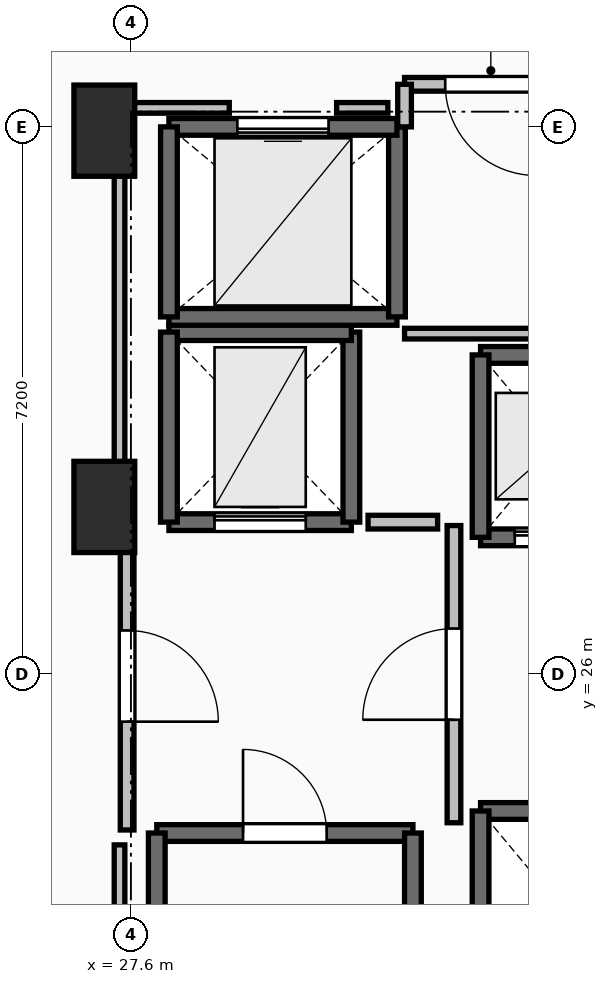
"""IFC4 building model, lengths in metres.
Left out: names, types, materials, properties, quantities, classifications, styles, units other than length and angle.
Written with IfcOpenShell. Run it as: python <this file> out.ifc"""

import sys

from ifc_helpers import new_model, si_unit, direction, frame, frame_2d, origin, origin_2d, place, context, subcontext, project, spatial, rectangle, extrude, element, fill, save


model = new_model("IFC4")
c1 = context("Model", 3, precision=1e-05, world=origin(), true_north=direction((0.0, 1.0)))
c2 = subcontext(c1, "Body", "Model", "MODEL_VIEW")
j1 = project(units=[si_unit("LENGTHUNIT", "METRE"), si_unit("PLANEANGLEUNIT", "RADIAN")], contexts=[c1])
p1 = place(None, origin())
s1 = spatial("IfcSite", under=j1, at=p1, CompositionType="ELEMENT")
p2 = place(p1, origin())
s2 = spatial("IfcBuilding", under=s1, at=p2, CompositionType="ELEMENT")
p3 = place(p2, frame((0.0, 0.0, 59.0)))
s3 = spatial("IfcBuildingStorey", under=s2, at=p3, CompositionType="ELEMENT", Elevation=59.0)
for number, where, z_axis, x_axis in (
    (1, (27.25, 28.2, 0.0), (0.0, 0.0, 1.0), (1.0, 0.0, 0.0)),
    (2, (27.25, 33.15, 0.0), (0.0, 0.0, 1.0), (1.0, 0.0, 0.0)),
):
    element("IfcColumn", number, at=place(p3, frame(where, z_axis=z_axis, x_axis=x_axis)), inside=s3, PredefinedType="PILASTER", context=c2, shape_type="SweptSolid", body=[
        extrude(rectangle(XDim=0.8, YDim=1.2, at=origin_2d()), origin(), (0.0, 0.0, 1.0), 3.5),
    ])
p4 = place(p3, frame((27.94, 23.91, 0.0), z_axis=(0.0, 0.0, 1.0), x_axis=(1.0, 0.0, 0.0)))
e3 = element("IfcWall", 3, at=p4, inside=s3, PredefinedType="SOLIDWALL", context=c2, shape_type="SweptSolid", body=[
    extrude(rectangle(XDim=3.37, YDim=0.22, at=frame_2d((1.685, 0.0))), origin(), (0.0, 0.0, 1.0), 3.24),
])
p5 = place(p4, frame((1.135, 0.0, 0.0)))
e4 = element("IfcOpeningElement", 4, at=p5, cuts=e3, PredefinedType="OPENING", context=c2, shape_type="SweptSolid", body=[
    extrude(rectangle(XDim=1.1, YDim=2.15, at=frame_2d((0.55, 1.075))), frame((0.0, 0.125, 0.0), z_axis=(0.0, -1.0, 0.0), x_axis=(1.0, 0.0, 0.0)), (0.0, 0.0, 1.0), 0.25),
])
for number, where, z_axis, x_axis in (
    (5, (31.31, 23.91, 0.0), (0.0, 0.0, 1.0), (0.0, -1.0, 0.0)),
    (6, (27.94, 16.49, 0.0), (0.0, 0.0, 1.0), (0.0, 1.0, 0.0)),
):
    element("IfcWall", number, at=place(p3, frame(where, z_axis=z_axis, x_axis=x_axis)), inside=s3, PredefinedType="SOLIDWALL", context=c2, shape_type="SweptSolid", body=[
        extrude(rectangle(XDim=7.42, YDim=0.22, at=frame_2d((3.71, 0.0))), origin(), (0.0, 0.0, 1.0), 3.24),
    ])
p6 = place(p3, frame((32.2, 27.8, 0.0), z_axis=(0.0, 0.0, 1.0), x_axis=(1.0, 0.0, 0.0)))
e7 = element("IfcWall", 7, at=p6, inside=s3, PredefinedType="SOLIDWALL", context=c2, shape_type="SweptSolid", body=[
    extrude(rectangle(XDim=2.0, YDim=0.22, at=frame_2d((1.0, 0.0))), origin(), (0.0, 0.0, 1.0), 3.24),
])
p7 = place(p6, frame((0.45, 0.0, 0.0)))
e8 = element("IfcOpeningElement", 8, at=p7, cuts=e7, PredefinedType="OPENING", context=c2, shape_type="SweptSolid", body=[
    extrude(rectangle(XDim=1.1, YDim=2.2, at=frame_2d((0.55, 1.1))), frame((0.0, 0.125, 0.0), z_axis=(0.0, -1.0, 0.0), x_axis=(1.0, 0.0, 0.0)), (0.0, 0.0, 1.0), 0.25),
])
p8 = place(p3, frame((34.2, 30.2, 0.0), z_axis=(0.0, 0.0, 1.0), x_axis=(-1.0, 0.0, 0.0)))
e9 = element("IfcWall", 9, at=p8, inside=s3, PredefinedType="SOLIDWALL", context=c2, shape_type="SweptSolid", body=[
    extrude(rectangle(XDim=2.0, YDim=0.22, at=frame_2d((1.0, 0.0))), origin(), (0.0, 0.0, 1.0), 3.24),
])
p9 = place(p3, frame((32.2, 30.2, 0.0), z_axis=(0.0, 0.0, 1.0), x_axis=(0.0, -1.0, 0.0)))
e10 = element("IfcWall", 10, at=p9, inside=s3, PredefinedType="SOLIDWALL", context=c2, shape_type="SweptSolid", body=[
    extrude(rectangle(XDim=2.4, YDim=0.22, at=frame_2d((1.2, 0.0))), origin(), (0.0, 0.0, 1.0), 3.24),
])
p10 = place(p3, frame((34.2, 24.2, 0.0), z_axis=(0.0, 0.0, 1.0), x_axis=(-1.0, 0.0, 0.0)))
e11 = element("IfcWall", 11, at=p10, inside=s3, PredefinedType="SOLIDWALL", context=c2, shape_type="SweptSolid", body=[
    extrude(rectangle(XDim=2.0, YDim=0.22, at=frame_2d((1.0, 0.0))), origin(), (0.0, 0.0, 1.0), 3.24),
])
p11 = place(p3, frame((32.2, 24.2, 0.0), z_axis=(0.0, 0.0, 1.0), x_axis=(0.0, -1.0, 0.0)))
e12 = element("IfcWall", 12, at=p11, inside=s3, PredefinedType="SOLIDWALL", context=c2, shape_type="SweptSolid", body=[
    extrude(rectangle(XDim=2.4, YDim=0.22, at=frame_2d((1.2, 0.0))), origin(), (0.0, 0.0, 1.0), 3.24),
])
p12 = place(p3, frame((28.1, 28.0, 0.0), z_axis=(0.0, 0.0, 1.0), x_axis=(1.0, 0.0, 0.0)))
e13 = element("IfcWall", 13, at=p12, inside=s3, PredefinedType="SHEAR", context=c2, shape_type="SweptSolid", body=[
    extrude(rectangle(XDim=2.4, YDim=0.22, at=frame_2d((1.2, 0.0))), origin(), (0.0, 0.0, 1.0), 3.24),
])
p13 = place(p12, frame((0.6, 0.0, 0.0)))
e14 = element("IfcOpeningElement", 14, at=p13, cuts=e13, PredefinedType="OPENING", context=c2, shape_type="SweptSolid", body=[
    extrude(rectangle(XDim=1.2, YDim=2.2, at=frame_2d((0.6, 1.1))), frame((0.0, 0.125, 0.0), z_axis=(0.0, -1.0, 0.0), x_axis=(1.0, 0.0, 0.0)), (0.0, 0.0, 1.0), 0.25),
])
p14 = place(p3, frame((30.5, 28.0, 0.0), z_axis=(0.0, 0.0, 1.0), x_axis=(0.0, 1.0, 0.0)))
e15 = element("IfcWall", 15, at=p14, inside=s3, PredefinedType="SHEAR", context=c2, shape_type="SweptSolid", body=[
    extrude(rectangle(XDim=2.5, YDim=0.22, at=frame_2d((1.25, 0.0))), origin(), (0.0, 0.0, 1.0), 3.24),
])
p15 = place(p3, frame((30.5, 30.5, 0.0), z_axis=(0.0, 0.0, 1.0), x_axis=(-1.0, 0.0, 0.0)))
e16 = element("IfcWall", 16, at=p15, inside=s3, PredefinedType="SHEAR", context=c2, shape_type="SweptSolid", body=[
    extrude(rectangle(XDim=2.4, YDim=0.22, at=frame_2d((1.2, 0.0))), origin(), (0.0, 0.0, 1.0), 3.24),
])
p16 = place(p3, frame((28.1, 30.5, 0.0), z_axis=(0.0, 0.0, 1.0), x_axis=(0.0, -1.0, 0.0)))
e17 = element("IfcWall", 17, at=p16, inside=s3, PredefinedType="SHEAR", context=c2, shape_type="SweptSolid", body=[
    extrude(rectangle(XDim=2.5, YDim=0.22, at=frame_2d((1.25, 0.0))), origin(), (0.0, 0.0, 1.0), 3.24),
])
p17 = place(p3, frame((28.1, 30.7, 0.0), z_axis=(0.0, 0.0, 1.0), x_axis=(1.0, 0.0, 0.0)))
e18 = element("IfcWall", 18, at=p17, inside=s3, PredefinedType="SOLIDWALL", context=c2, shape_type="SweptSolid", body=[
    extrude(rectangle(XDim=3.0, YDim=0.22, at=frame_2d((1.5, 0.0))), origin(), (0.0, 0.0, 1.0), 3.24),
])
p18 = place(p3, frame((31.1, 30.7, 0.0), z_axis=(0.0, 0.0, 1.0), x_axis=(0.0, 1.0, 0.0)))
e19 = element("IfcWall", 19, at=p18, inside=s3, PredefinedType="SOLIDWALL", context=c2, shape_type="SweptSolid", body=[
    extrude(rectangle(XDim=2.5, YDim=0.22, at=frame_2d((1.25, 0.0))), origin(), (0.0, 0.0, 1.0), 3.24),
])
p19 = place(p3, frame((31.1, 33.2, 0.0), z_axis=(0.0, 0.0, 1.0), x_axis=(-1.0, 0.0, 0.0)))
e20 = element("IfcWall", 20, at=p19, inside=s3, PredefinedType="SOLIDWALL", context=c2, shape_type="SweptSolid", body=[
    extrude(rectangle(XDim=3.0, YDim=0.22, at=frame_2d((1.5, 0.0))), origin(), (0.0, 0.0, 1.0), 3.24),
])
p20 = place(p19, frame((0.9, 0.0, 0.0)))
e21 = element("IfcOpeningElement", 21, at=p20, cuts=e20, PredefinedType="OPENING", context=c2, shape_type="SweptSolid", body=[
    extrude(rectangle(XDim=1.2, YDim=2.2, at=frame_2d((0.6, 1.1))), frame((0.0, 0.125, 0.0), z_axis=(0.0, -1.0, 0.0), x_axis=(1.0, 0.0, 0.0)), (0.0, 0.0, 1.0), 0.25),
])
p21 = place(p3, frame((28.1, 33.2, 0.0), z_axis=(0.0, 0.0, 1.0), x_axis=(0.0, -1.0, 0.0)))
e22 = element("IfcWall", 22, at=p21, inside=s3, PredefinedType="SOLIDWALL", context=c2, shape_type="SweptSolid", body=[
    extrude(rectangle(XDim=2.5, YDim=0.22, at=frame_2d((1.25, 0.0))), origin(), (0.0, 0.0, 1.0), 3.24),
])
p22 = place(p3, frame((31.85, 24.045, 0.0), z_axis=(0.0, 0.0, 1.0), x_axis=(0.0, 1.0, 0.0)))
e23 = element("IfcWall", 23, at=p22, inside=s3, PredefinedType="PARTITIONING", context=c2, shape_type="SweptSolid", body=[
    extrude(rectangle(XDim=3.91, YDim=0.18, at=frame_2d((1.955, 0.0))), origin(), (0.0, 0.0, 1.0), 3.24),
])
p23 = place(p22, frame((1.355, 0.0, 0.0)))
e24 = element("IfcOpeningElement", 24, at=p23, cuts=e23, PredefinedType="OPENING", context=c2, shape_type="SweptSolid", body=[
    extrude(rectangle(XDim=1.2, YDim=2.15, at=frame_2d((0.6, 1.075))), frame((0.0, 0.105, 0.0), z_axis=(0.0, -1.0, 0.0), x_axis=(1.0, 0.0, 0.0)), (0.0, 0.0, 1.0), 0.21),
])
p24 = place(p3, frame((27.55, 28.0, 0.0), z_axis=(0.0, 0.0, 1.0), x_axis=(0.0, -1.0, 0.0)))
e25 = element("IfcWall", 25, at=p24, inside=s3, PredefinedType="PARTITIONING", context=c2, shape_type="SweptSolid", body=[
    extrude(rectangle(XDim=4.05, YDim=0.18, at=frame_2d((2.025, 0.0))), origin(), (0.0, 0.0, 1.0), 3.24),
])
p25 = place(p24, frame((1.425, 0.0, 0.0)))
e26 = element("IfcOpeningElement", 26, at=p25, cuts=e25, PredefinedType="OPENING", context=c2, shape_type="SweptSolid", body=[
    extrude(rectangle(XDim=1.2, YDim=2.15, at=frame_2d((0.6, 1.075))), frame((0.0, 0.105, 0.0), z_axis=(0.0, -1.0, 0.0), x_axis=(1.0, 0.0, 0.0)), (0.0, 0.0, 1.0), 0.21),
])
p26 = place(p3, frame((33.47, 33.76, 0.0), z_axis=(0.0, 0.0, 1.0), x_axis=(-1.0, 0.0, 0.0)))
e27 = element("IfcWall", 27, at=p26, inside=s3, PredefinedType="PARTITIONING", context=c2, shape_type="SweptSolid", body=[
    extrude(rectangle(XDim=2.27, YDim=0.18, at=frame_2d((1.135, 0.0))), origin(), (0.0, 0.0, 1.0), 3.24),
])
p27 = place(p26, frame((0.535, 0.0, 0.0)))
e28 = element("IfcOpeningElement", 28, at=p27, cuts=e27, PredefinedType="OPENING", context=c2, shape_type="SweptSolid", body=[
    extrude(rectangle(XDim=1.2, YDim=2.15, at=frame_2d((0.6, 1.075))), frame((0.0, 0.105, 0.0), z_axis=(0.0, -1.0, 0.0), x_axis=(1.0, 0.0, 0.0)), (0.0, 0.0, 1.0), 0.21),
])
p28 = place(p3, frame((31.2, 33.76, 0.0), z_axis=(0.0, 0.0, 1.0), x_axis=(0.0, -1.0, 0.0)))
e29 = element("IfcWall", 29, at=p28, inside=s3, PredefinedType="PARTITIONING", context=c2, shape_type="SweptSolid", body=[
    extrude(rectangle(XDim=0.56, YDim=0.18, at=frame_2d((0.28, 0.0))), origin(), (0.0, 0.0, 1.0), 3.24),
])
p29 = place(p3, frame((31.635, 28.0, 0.0), z_axis=(0.0, 0.0, 1.0), x_axis=(-1.0, 0.0, 0.0)))
e30 = element("IfcWall", 30, at=p29, inside=s3, PredefinedType="PARTITIONING", context=c2, shape_type="SweptSolid", body=[
    extrude(rectangle(XDim=0.915, YDim=0.18, at=frame_2d((0.458, 0.0))), origin(), (0.0, 0.0, 1.0), 3.24),
])
p30 = place(p3, frame((31.2, 30.48, 0.0), z_axis=(0.0, 0.0, 1.0), x_axis=(1.0, 0.0, 0.0)))
e31 = element("IfcWall", 31, at=p30, inside=s3, PredefinedType="PARTITIONING", context=c2, shape_type="SweptSolid", body=[
    extrude(rectangle(XDim=2.05, YDim=0.14, at=frame_2d((1.025, 0.0))), origin(), (0.0, 0.0, 1.0), 3.24),
])
p31 = place(p3, frame((27.45, 16.24, 0.0), z_axis=(0.0, 0.0, 1.0), x_axis=(0.0, 1.0, 0.0)))
e32 = element("IfcWall", 32, at=p31, inside=s3, PredefinedType="PARTITIONING", context=c2, shape_type="SweptSolid", body=[
    extrude(rectangle(XDim=7.514, YDim=0.14, at=frame_2d((3.757, 0.0))), origin(), (0.0, 0.0, 1.0), 2.432),
])
p32 = place(p3, frame((27.45, 28.196, 0.0), z_axis=(0.0, 0.0, 1.0), x_axis=(0.0, 1.0, 0.0)))
e33 = element("IfcWall", 33, at=p32, inside=s3, PredefinedType="PARTITIONING", context=c2, shape_type="SweptSolid", body=[
    extrude(rectangle(XDim=5.254, YDim=0.14, at=frame_2d((2.627, 0.0))), origin(), (0.0, 0.0, 1.0), 2.432),
])
p33 = place(p3, frame((27.45, 33.45, 0.0), z_axis=(0.0, 0.0, 1.0), x_axis=(1.0, 0.0, 0.0)))
e34 = element("IfcWall", 34, at=p33, inside=s3, PredefinedType="PARTITIONING", context=c2, shape_type="SweptSolid", body=[
    extrude(rectangle(XDim=1.444, YDim=0.14, at=frame_2d((0.722, 0.0))), origin(), (0.0, 0.0, 1.0), 2.432),
])
p34 = place(p3, frame((30.306, 33.45, 0.0), z_axis=(0.0, 0.0, 1.0), x_axis=(1.0, 0.0, 0.0)))
e35 = element("IfcWall", 35, at=p34, inside=s3, PredefinedType="PARTITIONING", context=c2, shape_type="SweptSolid", body=[
    extrude(rectangle(XDim=0.674, YDim=0.14, at=frame_2d((0.337, 0.0))), origin(), (0.0, 0.0, 1.0), 3.24),
])
p35 = place(p5, origin())
e36 = element("IfcDoor", 36, at=p35, inside=s3, OperationType="SINGLE_SWING_LEFT", PredefinedType="DOOR", context=c2, shape_type="SweptSolid", body=[
    extrude(rectangle(XDim=1.1, YDim=2.15, at=frame_2d((0.55, 1.075))), frame((0.0, 0.025, 0.0), z_axis=(0.0, -1.0, 0.0), x_axis=(1.0, 0.0, 0.0)), (0.0, 0.0, 1.0), 0.05),
])
fill(e4, e36)
p36 = place(p7, origin())
e37 = element("IfcDoor", 37, at=p36, inside=s3, OperationType="SLIDING_TO_LEFT", PredefinedType="DOOR", context=c2, shape_type="SweptSolid", body=[
    extrude(rectangle(XDim=1.1, YDim=2.2, at=frame_2d((0.55, 1.1))), frame((0.0, 0.025, 0.0), z_axis=(0.0, -1.0, 0.0), x_axis=(1.0, 0.0, 0.0)), (0.0, 0.0, 1.0), 0.05),
])
fill(e8, e37)
p37 = place(p13, origin())
e38 = element("IfcDoor", 38, at=p37, inside=s3, OperationType="SLIDING_TO_LEFT", PredefinedType="DOOR", context=c2, shape_type="SweptSolid", body=[
    extrude(rectangle(XDim=1.2, YDim=2.2, at=frame_2d((0.6, 1.1))), frame((0.0, 0.025, 0.0), z_axis=(0.0, -1.0, 0.0), x_axis=(1.0, 0.0, 0.0)), (0.0, 0.0, 1.0), 0.05),
])
fill(e14, e38)
p38 = place(p20, origin())
e39 = element("IfcDoor", 39, at=p38, inside=s3, OperationType="SLIDING_TO_LEFT", PredefinedType="DOOR", context=c2, shape_type="SweptSolid", body=[
    extrude(rectangle(XDim=1.2, YDim=2.2, at=frame_2d((0.6, 1.1))), frame((0.0, 0.025, 0.0), z_axis=(0.0, -1.0, 0.0), x_axis=(1.0, 0.0, 0.0)), (0.0, 0.0, 1.0), 0.05),
])
fill(e21, e39)
p39 = place(p23, origin())
e40 = element("IfcDoor", 40, at=p39, inside=s3, OperationType="SINGLE_SWING_LEFT", PredefinedType="DOOR", context=c2, shape_type="SweptSolid", body=[
    extrude(rectangle(XDim=1.2, YDim=2.15, at=frame_2d((0.6, 1.075))), frame((0.0, 0.025, 0.0), z_axis=(0.0, -1.0, 0.0), x_axis=(1.0, 0.0, 0.0)), (0.0, 0.0, 1.0), 0.05),
])
fill(e24, e40)
p40 = place(p25, origin())
e41 = element("IfcDoor", 41, at=p40, inside=s3, OperationType="SINGLE_SWING_RIGHT", PredefinedType="DOOR", context=c2, shape_type="SweptSolid", body=[
    extrude(rectangle(XDim=1.2, YDim=2.15, at=frame_2d((0.6, 1.075))), frame((0.0, 0.025, 0.0), z_axis=(0.0, -1.0, 0.0), x_axis=(1.0, 0.0, 0.0)), (0.0, 0.0, 1.0), 0.05),
])
fill(e26, e41)
p41 = place(p27, origin())
e42 = element("IfcDoor", 42, at=p41, inside=s3, OperationType="SINGLE_SWING_LEFT", PredefinedType="DOOR", context=c2, shape_type="SweptSolid", body=[
    extrude(rectangle(XDim=1.2, YDim=2.15, at=frame_2d((0.6, 1.075))), frame((0.0, 0.025, 0.0), z_axis=(0.0, -1.0, 0.0), x_axis=(1.0, 0.0, 0.0)), (0.0, 0.0, 1.0), 0.05),
])
fill(e28, e42)
save(model, sys.argv[1])
